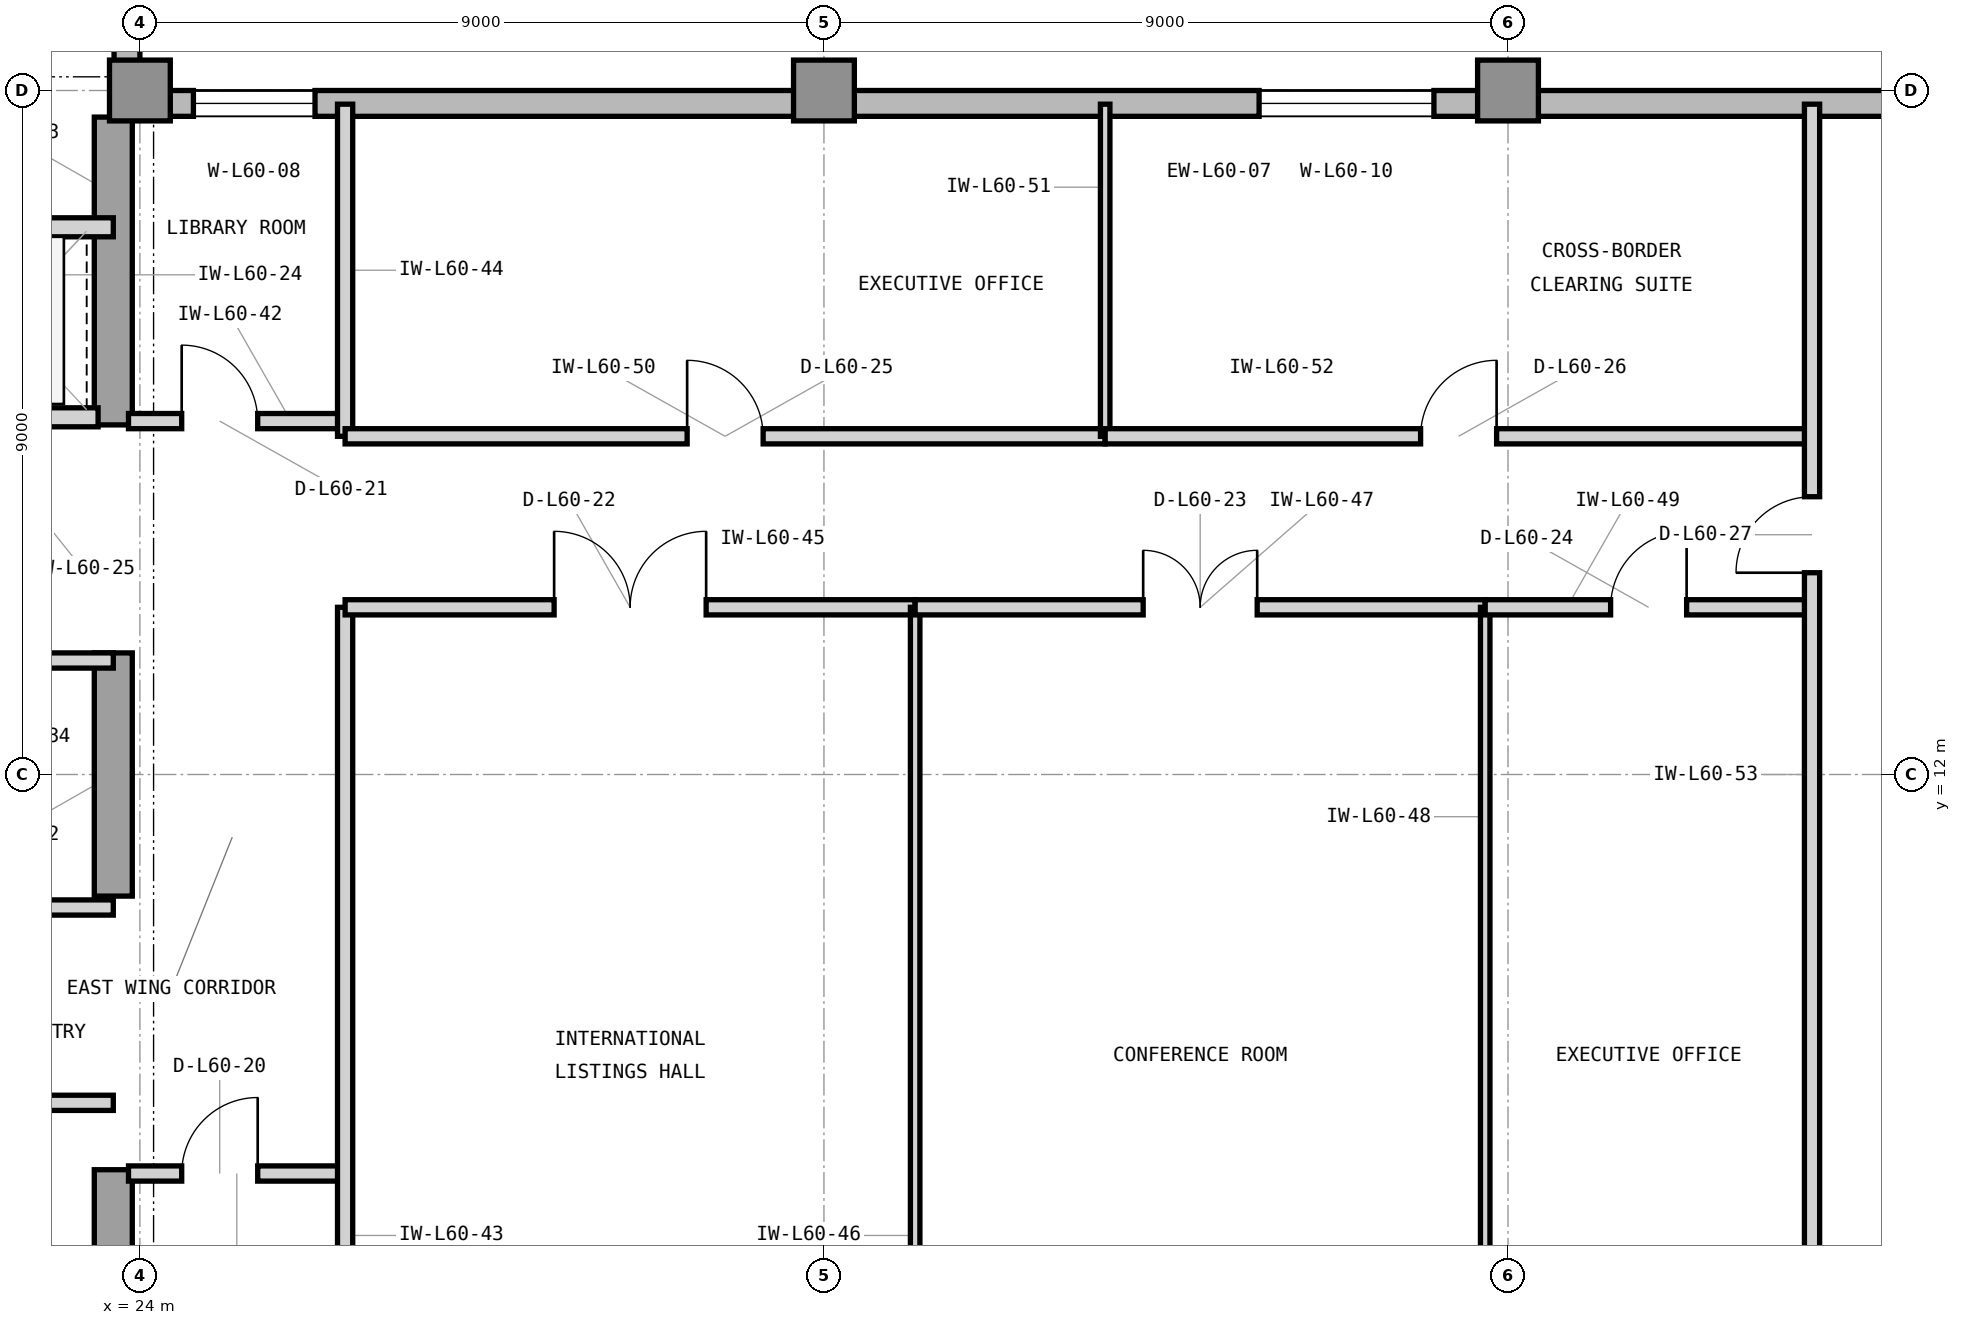
"""IFC4 building model, lengths in metres.
Left out: names, types, materials, properties, quantities, classifications, styles, units other than length and angle.
Written with IfcOpenShell. Run it as: python <this file> out.ifc"""

import sys

from ifc_helpers import new_model, si_unit, direction, frame, frame_2d, origin, origin_2d, place, context, subcontext, project, spatial, rectangle, extrude, element, fill, save


model = new_model("IFC4")
c1 = context("Model", 3, precision=1e-05, world=origin(), true_north=direction((0.0, 1.0)))
c2 = subcontext(c1, "Body", "Model", "MODEL_VIEW")
j1 = project(units=[si_unit("LENGTHUNIT", "METRE"), si_unit("PLANEANGLEUNIT", "RADIAN")], contexts=[c1])
p1 = place(None, origin())
s1 = spatial("IfcSite", under=j1, at=p1, CompositionType="ELEMENT")
p2 = place(p1, origin())
s2 = spatial("IfcBuilding", under=s1, at=p2, CompositionType="ELEMENT")
p3 = place(p2, frame((0.0, 0.0, 246.9)))
s3 = spatial("IfcBuildingStorey", under=s2, at=p3, CompositionType="ELEMENT", Elevation=246.9)
p4 = place(p3, frame((23.65, 3.6, 0.0), z_axis=(0.0, 0.0, 1.0), x_axis=(0.0, 1.0, 0.0)))
e1 = element("IfcWall", 1, at=p4, inside=s3, PredefinedType="SHEAR", context=c2, shape_type="SweptSolid", body=[
    extrude(rectangle(XDim=3.2, YDim=0.5, at=frame_2d((1.6, 0.0))), origin(), (0.0, 0.0, 1.0), 3.9),
])
p5 = place(p3, frame((23.65, 10.4, 0.0), z_axis=(0.0, 0.0, 1.0), x_axis=(0.0, 1.0, 0.0)))
e2 = element("IfcWall", 2, at=p5, inside=s3, PredefinedType="SHEAR", context=c2, shape_type="SweptSolid", body=[
    extrude(rectangle(XDim=3.2, YDim=0.5, at=frame_2d((1.6, 0.0))), origin(), (0.0, 0.0, 1.0), 3.9),
])
p6 = place(p3, frame((23.65, 16.6, 0.0), z_axis=(0.0, 0.0, 1.0), x_axis=(0.0, 1.0, 0.0)))
e3 = element("IfcWall", 3, at=p6, inside=s3, PredefinedType="SHEAR", context=c2, shape_type="SweptSolid", body=[
    extrude(rectangle(XDim=4.05, YDim=0.5, at=frame_2d((2.025, 0.0))), origin(), (0.0, 0.0, 1.0), 3.9),
])
for number, where, z_axis, x_axis in (
    (4, (24.0, 21.0, 0.0), (0.0, 0.0, 1.0), (1.0, 0.0, 0.0)),
    (5, (33.0, 21.0, 0.0), (0.0, 0.0, 1.0), (1.0, 0.0, 0.0)),
    (6, (42.0, 21.0, 0.0), (0.0, 0.0, 1.0), (1.0, 0.0, 0.0)),
):
    element("IfcColumn", number, at=place(p3, frame(where, z_axis=z_axis, x_axis=x_axis)), inside=s3, PredefinedType="COLUMN", context=c2, shape_type="SweptSolid", body=[
        extrude(rectangle(XDim=0.8, YDim=0.8, at=origin_2d()), origin(), (0.0, 0.0, 1.0), 3.9),
    ])
p7 = place(p3, frame((52.4, 20.83, 0.0), z_axis=(0.0, 0.0, 1.0), x_axis=(-1.0, 0.0, 0.0)))
e7 = element("IfcWall", 7, at=p7, inside=s3, PredefinedType="STANDARD", context=c2, shape_type="SweptSolid", body=[
    extrude(rectangle(XDim=28.4, YDim=0.34, at=frame_2d((14.2, 0.0))), origin(), (0.0, 0.0, 1.0), 3.7),
])
p8 = place(p7, frame((26.096, 0.0, 0.9)))
e8 = element("IfcOpeningElement", 8, at=p8, cuts=e7, PredefinedType="OPENING", context=c2, shape_type="SweptSolid", body=[
    extrude(rectangle(XDim=1.6, YDim=2.2, at=frame_2d((0.8, 1.1))), frame((0.0, 0.18, 0.0), z_axis=(0.0, -1.0, 0.0), x_axis=(1.0, 0.0, 0.0)), (0.0, 0.0, 1.0), 0.36),
])
p9 = place(p7, frame((11.375, 0.0, 0.9)))
e9 = element("IfcOpeningElement", 9, at=p9, cuts=e7, PredefinedType="OPENING", context=c2, shape_type="SweptSolid", body=[
    extrude(rectangle(XDim=2.3, YDim=2.2, at=frame_2d((1.15, 1.1))), frame((0.0, 0.18, 0.0), z_axis=(0.0, -1.0, 0.0), x_axis=(1.0, 0.0, 0.0)), (0.0, 0.0, 1.0), 0.36),
])
p10 = place(p3, frame((23.83, 21.0, 0.0), z_axis=(0.0, 0.0, 1.0), x_axis=(0.0, 1.0, 0.0)))
e10 = element("IfcWall", 10, at=p10, inside=s3, PredefinedType="STANDARD", context=c2, shape_type="SweptSolid", body=[
    extrude(rectangle(XDim=19.4, YDim=0.34, at=frame_2d((9.7, 0.0))), origin(), (0.0, 0.0, 1.0), 3.7),
])
p11 = place(p10, frame((10.975, 0.0, 0.9)))
e11 = element("IfcOpeningElement", 11, at=p11, cuts=e10, PredefinedType="OPENING", context=c2, shape_type="SweptSolid", body=[
    extrude(rectangle(XDim=2.3, YDim=2.2, at=frame_2d((1.15, 1.1))), frame((0.0, 0.18, 0.0), z_axis=(0.0, -1.0, 0.0), x_axis=(1.0, 0.0, 0.0)), (0.0, 0.0, 1.0), 0.36),
])
p12 = place(p3, frame((21.05, 16.7, 0.0), z_axis=(0.0, 0.0, 1.0), x_axis=(1.0, 0.0, 0.0)))
e12 = element("IfcWall", 12, at=p12, inside=s3, PredefinedType="PARTITIONING", context=c2, shape_type="SweptSolid", body=[
    extrude(rectangle(XDim=2.4, YDim=0.25, at=frame_2d((1.2, 0.0))), origin(), (0.0, 0.0, 1.0), 3.073),
])
p13 = place(p12, frame((0.52, 0.0, 0.0)))
e13 = element("IfcOpeningElement", 13, at=p13, cuts=e12, PredefinedType="OPENING", context=c2, shape_type="SweptSolid", body=[
    extrude(rectangle(XDim=1.15, YDim=2.25, at=frame_2d((0.575, 1.125))), frame((0.0, 0.135, 0.0), z_axis=(0.0, -1.0, 0.0), x_axis=(1.0, 0.0, 0.0)), (0.0, 0.0, 1.0), 0.27),
])
p14 = place(p3, frame((16.45, 19.2, 0.0), z_axis=(0.0, 0.0, 1.0), x_axis=(1.0, 0.0, 0.0)))
e14 = element("IfcWall", 14, at=p14, inside=s3, PredefinedType="PARTITIONING", context=c2, shape_type="SweptSolid", body=[
    extrude(rectangle(XDim=7.2, YDim=0.25, at=frame_2d((3.6, 0.0))), origin(), (0.0, 0.0, 1.0), 3.69),
])
p15 = place(p3, frame((20.55, 7.68, 0.0), z_axis=(0.0, 0.0, 1.0), x_axis=(1.0, 0.0, 0.0)))
e15 = element("IfcWall", 15, at=p15, inside=s3, PredefinedType="PARTITIONING", context=c2, shape_type="SweptSolid", body=[
    extrude(rectangle(XDim=3.1, YDim=0.2, at=frame_2d((1.55, 0.0))), origin(), (0.0, 0.0, 1.0), 3.69),
])
p16 = place(p15, frame((1.075, 0.0, 0.0)))
e16 = element("IfcOpeningElement", 16, at=p16, cuts=e15, PredefinedType="OPENING", context=c2, shape_type="SweptSolid", body=[
    extrude(rectangle(XDim=0.95, YDim=2.1, at=frame_2d((0.475, 1.05))), frame((0.0, 0.11, 0.0), z_axis=(0.0, -1.0, 0.0), x_axis=(1.0, 0.0, 0.0)), (0.0, 0.0, 1.0), 0.22),
])
p17 = place(p3, frame((14.825, 10.25, 0.0), z_axis=(0.0, 0.0, 1.0), x_axis=(1.0, 0.0, 0.0)))
e17 = element("IfcWall", 17, at=p17, inside=s3, PredefinedType="PARTITIONING", context=c2, shape_type="SweptSolid", body=[
    extrude(rectangle(XDim=8.825, YDim=0.2, at=frame_2d((4.413, 0.0))), origin(), (0.0, 0.0, 1.0), 3.69),
])
p18 = place(p3, frame((18.45, 13.5, 0.0), z_axis=(0.0, 0.0, 1.0), x_axis=(1.0, 0.0, 0.0)))
e18 = element("IfcWall", 18, at=p18, inside=s3, PredefinedType="PARTITIONING", context=c2, shape_type="SweptSolid", body=[
    extrude(rectangle(XDim=5.2, YDim=0.2, at=frame_2d((2.6, 0.0))), origin(), (0.0, 0.0, 1.0), 3.073),
])
p19 = place(p18, frame((2.125, 0.0, 0.0)))
e19 = element("IfcOpeningElement", 19, at=p19, cuts=e18, PredefinedType="OPENING", context=c2, shape_type="SweptSolid", body=[
    extrude(rectangle(XDim=0.95, YDim=2.1, at=frame_2d((0.475, 1.05))), frame((0.0, 0.11, 0.0), z_axis=(0.0, -1.0, 0.0), x_axis=(1.0, 0.0, 0.0)), (0.0, 0.0, 1.0), 0.22),
])
p20 = place(p3, frame((23.85, 6.75, 0.0), z_axis=(0.0, 0.0, 1.0), x_axis=(1.0, 0.0, 0.0)))
e20 = element("IfcWall", 20, at=p20, inside=s3, PredefinedType="PARTITIONING", context=c2, shape_type="SweptSolid", body=[
    extrude(rectangle(XDim=2.85, YDim=0.2, at=frame_2d((1.425, 0.0))), origin(), (0.0, 0.0, 1.0), 3.69),
])
p21 = place(p20, frame((0.7, 0.0, 0.0)))
e21 = element("IfcOpeningElement", 21, at=p21, cuts=e20, PredefinedType="OPENING", context=c2, shape_type="SweptSolid", body=[
    extrude(rectangle(XDim=1.0, YDim=2.15, at=frame_2d((0.5, 1.075))), frame((0.0, 0.11, 0.0), z_axis=(0.0, -1.0, 0.0), x_axis=(1.0, 0.0, 0.0)), (0.0, 0.0, 1.0), 0.22),
])
p22 = place(p3, frame((23.85, 16.65, 0.0), z_axis=(0.0, 0.0, 1.0), x_axis=(1.0, 0.0, 0.0)))
e22 = element("IfcWall", 22, at=p22, inside=s3, PredefinedType="PARTITIONING", context=c2, shape_type="SweptSolid", body=[
    extrude(rectangle(XDim=2.85, YDim=0.2, at=frame_2d((1.425, 0.0))), origin(), (0.0, 0.0, 1.0), 3.69),
])
p23 = place(p22, frame((0.7, 0.0, 0.0)))
e23 = element("IfcOpeningElement", 23, at=p23, cuts=e22, PredefinedType="OPENING", context=c2, shape_type="SweptSolid", body=[
    extrude(rectangle(XDim=1.0, YDim=2.15, at=frame_2d((0.5, 1.075))), frame((0.0, 0.11, 0.0), z_axis=(0.0, -1.0, 0.0), x_axis=(1.0, 0.0, 0.0)), (0.0, 0.0, 1.0), 0.22),
])
p24 = place(p3, frame((26.7, 3.18, 0.0), z_axis=(0.0, 0.0, 1.0), x_axis=(0.0, 1.0, 0.0)))
e24 = element("IfcWall", 24, at=p24, inside=s3, PredefinedType="PARTITIONING", context=c2, shape_type="SweptSolid", body=[
    extrude(rectangle(XDim=11.02, YDim=0.2, at=frame_2d((5.51, 0.0))), origin(), (0.0, 0.0, 1.0), 3.69),
])
p25 = place(p3, frame((26.7, 16.45, 0.0), z_axis=(0.0, 0.0, 1.0), x_axis=(0.0, 1.0, 0.0)))
e25 = element("IfcWall", 25, at=p25, inside=s3, PredefinedType="PARTITIONING", context=c2, shape_type="SweptSolid", body=[
    extrude(rectangle(XDim=4.37, YDim=0.2, at=frame_2d((2.185, 0.0))), origin(), (0.0, 0.0, 1.0), 3.69),
])
p26 = place(p3, frame((26.7, 14.2, 0.0), z_axis=(0.0, 0.0, 1.0), x_axis=(1.0, 0.0, 0.0)))
e26 = element("IfcWall", 26, at=p26, inside=s3, PredefinedType="PARTITIONING", context=c2, shape_type="SweptSolid", body=[
    extrude(rectangle(XDim=7.5, YDim=0.2, at=frame_2d((3.75, 0.0))), origin(), (0.0, 0.0, 1.0), 3.69),
])
p27 = place(p26, frame((2.75, 0.0, 0.0)))
e27 = element("IfcOpeningElement", 27, at=p27, cuts=e26, PredefinedType="OPENING", context=c2, shape_type="SweptSolid", body=[
    extrude(rectangle(XDim=2.0, YDim=2.5, at=frame_2d((1.0, 1.25))), frame((0.0, 0.11, 0.0), z_axis=(0.0, -1.0, 0.0), x_axis=(1.0, 0.0, 0.0)), (0.0, 0.0, 1.0), 0.22),
])
p28 = place(p3, frame((34.2, 3.18, 0.0), z_axis=(0.0, 0.0, 1.0), x_axis=(0.0, 1.0, 0.0)))
e28 = element("IfcWall", 28, at=p28, inside=s3, PredefinedType="PARTITIONING", context=c2, shape_type="SweptSolid", body=[
    extrude(rectangle(XDim=11.02, YDim=0.125, at=frame_2d((5.51, 0.0))), origin(), (0.0, 0.0, 1.0), 3.69),
])
p29 = place(p3, frame((34.2, 14.2, 0.0), z_axis=(0.0, 0.0, 1.0), x_axis=(1.0, 0.0, 0.0)))
e29 = element("IfcWall", 29, at=p29, inside=s3, PredefinedType="PARTITIONING", context=c2, shape_type="SweptSolid", body=[
    extrude(rectangle(XDim=7.5, YDim=0.2, at=frame_2d((3.75, 0.0))), origin(), (0.0, 0.0, 1.0), 3.69),
])
p30 = place(p29, frame((3.0, 0.0, 0.0)))
e30 = element("IfcOpeningElement", 30, at=p30, cuts=e29, PredefinedType="OPENING", context=c2, shape_type="SweptSolid", body=[
    extrude(rectangle(XDim=1.5, YDim=2.3, at=frame_2d((0.75, 1.15))), frame((0.0, 0.11, 0.0), z_axis=(0.0, -1.0, 0.0), x_axis=(1.0, 0.0, 0.0)), (0.0, 0.0, 1.0), 0.22),
])
p31 = place(p3, frame((41.7, 3.18, 0.0), z_axis=(0.0, 0.0, 1.0), x_axis=(0.0, 1.0, 0.0)))
e31 = element("IfcWall", 31, at=p31, inside=s3, PredefinedType="PARTITIONING", context=c2, shape_type="SweptSolid", body=[
    extrude(rectangle(XDim=11.02, YDim=0.125, at=frame_2d((5.51, 0.0))), origin(), (0.0, 0.0, 1.0), 3.69),
])
p32 = place(p3, frame((41.7, 14.2, 0.0), z_axis=(0.0, 0.0, 1.0), x_axis=(1.0, 0.0, 0.0)))
e32 = element("IfcWall", 32, at=p32, inside=s3, PredefinedType="PARTITIONING", context=c2, shape_type="SweptSolid", body=[
    extrude(rectangle(XDim=4.3, YDim=0.2, at=frame_2d((2.15, 0.0))), origin(), (0.0, 0.0, 1.0), 3.69),
])
p33 = place(p32, frame((1.65, 0.0, 0.0)))
e33 = element("IfcOpeningElement", 33, at=p33, cuts=e32, PredefinedType="OPENING", context=c2, shape_type="SweptSolid", body=[
    extrude(rectangle(XDim=1.0, YDim=2.15, at=frame_2d((0.5, 1.075))), frame((0.0, 0.11, 0.0), z_axis=(0.0, -1.0, 0.0), x_axis=(1.0, 0.0, 0.0)), (0.0, 0.0, 1.0), 0.22),
])
p34 = place(p3, frame((26.7, 16.45, 0.0), z_axis=(0.0, 0.0, 1.0), x_axis=(1.0, 0.0, 0.0)))
e34 = element("IfcWall", 34, at=p34, inside=s3, PredefinedType="PARTITIONING", context=c2, shape_type="SweptSolid", body=[
    extrude(rectangle(XDim=10.0, YDim=0.2, at=frame_2d((5.0, 0.0))), origin(), (0.0, 0.0, 1.0), 3.69),
])
p35 = place(p34, frame((4.5, 0.0, 0.0)))
e35 = element("IfcOpeningElement", 35, at=p35, cuts=e34, PredefinedType="OPENING", context=c2, shape_type="SweptSolid", body=[
    extrude(rectangle(XDim=1.0, YDim=2.15, at=frame_2d((0.5, 1.075))), frame((0.0, 0.11, 0.0), z_axis=(0.0, -1.0, 0.0), x_axis=(1.0, 0.0, 0.0)), (0.0, 0.0, 1.0), 0.22),
])
p36 = place(p3, frame((36.7, 16.45, 0.0), z_axis=(0.0, 0.0, 1.0), x_axis=(0.0, 1.0, 0.0)))
e36 = element("IfcWall", 36, at=p36, inside=s3, PredefinedType="PARTITIONING", context=c2, shape_type="SweptSolid", body=[
    extrude(rectangle(XDim=4.37, YDim=0.125, at=frame_2d((2.185, 0.0))), origin(), (0.0, 0.0, 1.0), 3.69),
])
p37 = place(p3, frame((36.7, 16.45, 0.0), z_axis=(0.0, 0.0, 1.0), x_axis=(1.0, 0.0, 0.0)))
e37 = element("IfcWall", 37, at=p37, inside=s3, PredefinedType="PARTITIONING", context=c2, shape_type="SweptSolid", body=[
    extrude(rectangle(XDim=9.3, YDim=0.2, at=frame_2d((4.65, 0.0))), origin(), (0.0, 0.0, 1.0), 3.69),
])
p38 = place(p37, frame((4.15, 0.0, 0.0)))
e38 = element("IfcOpeningElement", 38, at=p38, cuts=e37, PredefinedType="OPENING", context=c2, shape_type="SweptSolid", body=[
    extrude(rectangle(XDim=1.0, YDim=2.15, at=frame_2d((0.5, 1.075))), frame((0.0, 0.11, 0.0), z_axis=(0.0, -1.0, 0.0), x_axis=(1.0, 0.0, 0.0)), (0.0, 0.0, 1.0), 0.22),
])
p39 = place(p3, frame((46.0, 3.18, 0.0), z_axis=(0.0, 0.0, 1.0), x_axis=(0.0, 1.0, 0.0)))
e39 = element("IfcWall", 39, at=p39, inside=s3, PredefinedType="PARTITIONING", context=c2, shape_type="SweptSolid", body=[
    extrude(rectangle(XDim=17.64, YDim=0.2, at=frame_2d((8.82, 0.0))), origin(), (0.0, 0.0, 1.0), 3.69),
])
p40 = place(p39, frame((11.475, 0.0, 0.0)))
e40 = element("IfcOpeningElement", 40, at=p40, cuts=e39, PredefinedType="OPENING", context=c2, shape_type="SweptSolid", body=[
    extrude(rectangle(XDim=1.0, YDim=2.15, at=frame_2d((0.5, 1.075))), frame((0.0, 0.11, 0.0), z_axis=(0.0, -1.0, 0.0), x_axis=(1.0, 0.0, 0.0)), (0.0, 0.0, 1.0), 0.22),
])
p41 = place(p21, origin())
e41 = element("IfcDoor", 41, at=p41, inside=s3, OperationType="SINGLE_SWING_RIGHT", PredefinedType="DOOR", context=c2, shape_type="SweptSolid", body=[
    extrude(rectangle(XDim=1.0, YDim=2.15, at=frame_2d((0.5, 1.075))), frame((0.0, 0.025, 0.0), z_axis=(0.0, -1.0, 0.0), x_axis=(1.0, 0.0, 0.0)), (0.0, 0.0, 1.0), 0.05),
])
fill(e21, e41)
p42 = place(p23, origin())
e42 = element("IfcDoor", 42, at=p42, inside=s3, OperationType="SINGLE_SWING_LEFT", PredefinedType="DOOR", context=c2, shape_type="SweptSolid", body=[
    extrude(rectangle(XDim=1.0, YDim=2.15, at=frame_2d((0.5, 1.075))), frame((0.0, 0.025, 0.0), z_axis=(0.0, -1.0, 0.0), x_axis=(1.0, 0.0, 0.0)), (0.0, 0.0, 1.0), 0.05),
])
fill(e23, e42)
p43 = place(p27, origin())
e43 = element("IfcDoor", 43, at=p43, inside=s3, OperationType="DOUBLE_DOOR_SINGLE_SWING", PredefinedType="DOOR", context=c2, shape_type="SweptSolid", body=[
    extrude(rectangle(XDim=2.0, YDim=2.5, at=frame_2d((1.0, 1.25))), frame((0.0, 0.025, 0.0), z_axis=(0.0, -1.0, 0.0), x_axis=(1.0, 0.0, 0.0)), (0.0, 0.0, 1.0), 0.05),
])
fill(e27, e43)
p44 = place(p30, origin())
e44 = element("IfcDoor", 44, at=p44, inside=s3, OperationType="DOUBLE_DOOR_SINGLE_SWING", PredefinedType="DOOR", context=c2, shape_type="SweptSolid", body=[
    extrude(rectangle(XDim=1.5, YDim=2.3, at=frame_2d((0.75, 1.15))), frame((0.0, 0.025, 0.0), z_axis=(0.0, -1.0, 0.0), x_axis=(1.0, 0.0, 0.0)), (0.0, 0.0, 1.0), 0.05),
])
fill(e30, e44)
p45 = place(p33, origin())
e45 = element("IfcDoor", 45, at=p45, inside=s3, OperationType="SINGLE_SWING_RIGHT", PredefinedType="DOOR", context=c2, shape_type="SweptSolid", body=[
    extrude(rectangle(XDim=1.0, YDim=2.15, at=frame_2d((0.5, 1.075))), frame((0.0, 0.025, 0.0), z_axis=(0.0, -1.0, 0.0), x_axis=(1.0, 0.0, 0.0)), (0.0, 0.0, 1.0), 0.05),
])
fill(e33, e45)
p46 = place(p35, origin())
e46 = element("IfcDoor", 46, at=p46, inside=s3, OperationType="SINGLE_SWING_LEFT", PredefinedType="DOOR", context=c2, shape_type="SweptSolid", body=[
    extrude(rectangle(XDim=1.0, YDim=2.15, at=frame_2d((0.5, 1.075))), frame((0.0, 0.025, 0.0), z_axis=(0.0, -1.0, 0.0), x_axis=(1.0, 0.0, 0.0)), (0.0, 0.0, 1.0), 0.05),
])
fill(e35, e46)
p47 = place(p38, origin())
e47 = element("IfcDoor", 47, at=p47, inside=s3, OperationType="SINGLE_SWING_RIGHT", PredefinedType="DOOR", context=c2, shape_type="SweptSolid", body=[
    extrude(rectangle(XDim=1.0, YDim=2.15, at=frame_2d((0.5, 1.075))), frame((0.0, 0.025, 0.0), z_axis=(0.0, -1.0, 0.0), x_axis=(1.0, 0.0, 0.0)), (0.0, 0.0, 1.0), 0.05),
])
fill(e38, e47)
p48 = place(p40, origin())
e48 = element("IfcDoor", 48, at=p48, inside=s3, OperationType="SINGLE_SWING_LEFT", PredefinedType="DOOR", context=c2, shape_type="SweptSolid", body=[
    extrude(rectangle(XDim=1.0, YDim=2.15, at=frame_2d((0.5, 1.075))), frame((0.0, 0.025, 0.0), z_axis=(0.0, -1.0, 0.0), x_axis=(1.0, 0.0, 0.0)), (0.0, 0.0, 1.0), 0.05),
])
fill(e40, e48)
p49 = place(p8, origin())
e49 = element("IfcWindow", 49, at=p49, inside=s3, PartitioningType="SINGLE_PANEL", PredefinedType="WINDOW", context=c2, shape_type="SweptSolid", body=[
    extrude(rectangle(XDim=1.6, YDim=2.2, at=frame_2d((0.8, 1.1))), frame((0.0, 0.11, 0.0), z_axis=(0.0, -1.0, 0.0), x_axis=(1.0, 0.0, 0.0)), (0.0, 0.0, 1.0), 0.06),
])
fill(e8, e49)
p50 = place(p9, origin())
e50 = element("IfcWindow", 50, at=p50, inside=s3, PartitioningType="SINGLE_PANEL", PredefinedType="WINDOW", context=c2, shape_type="SweptSolid", body=[
    extrude(rectangle(XDim=2.3, YDim=2.2, at=frame_2d((1.15, 1.1))), frame((0.0, 0.11, 0.0), z_axis=(0.0, -1.0, 0.0), x_axis=(1.0, 0.0, 0.0)), (0.0, 0.0, 1.0), 0.06),
])
fill(e9, e50)
save(model, sys.argv[1])
